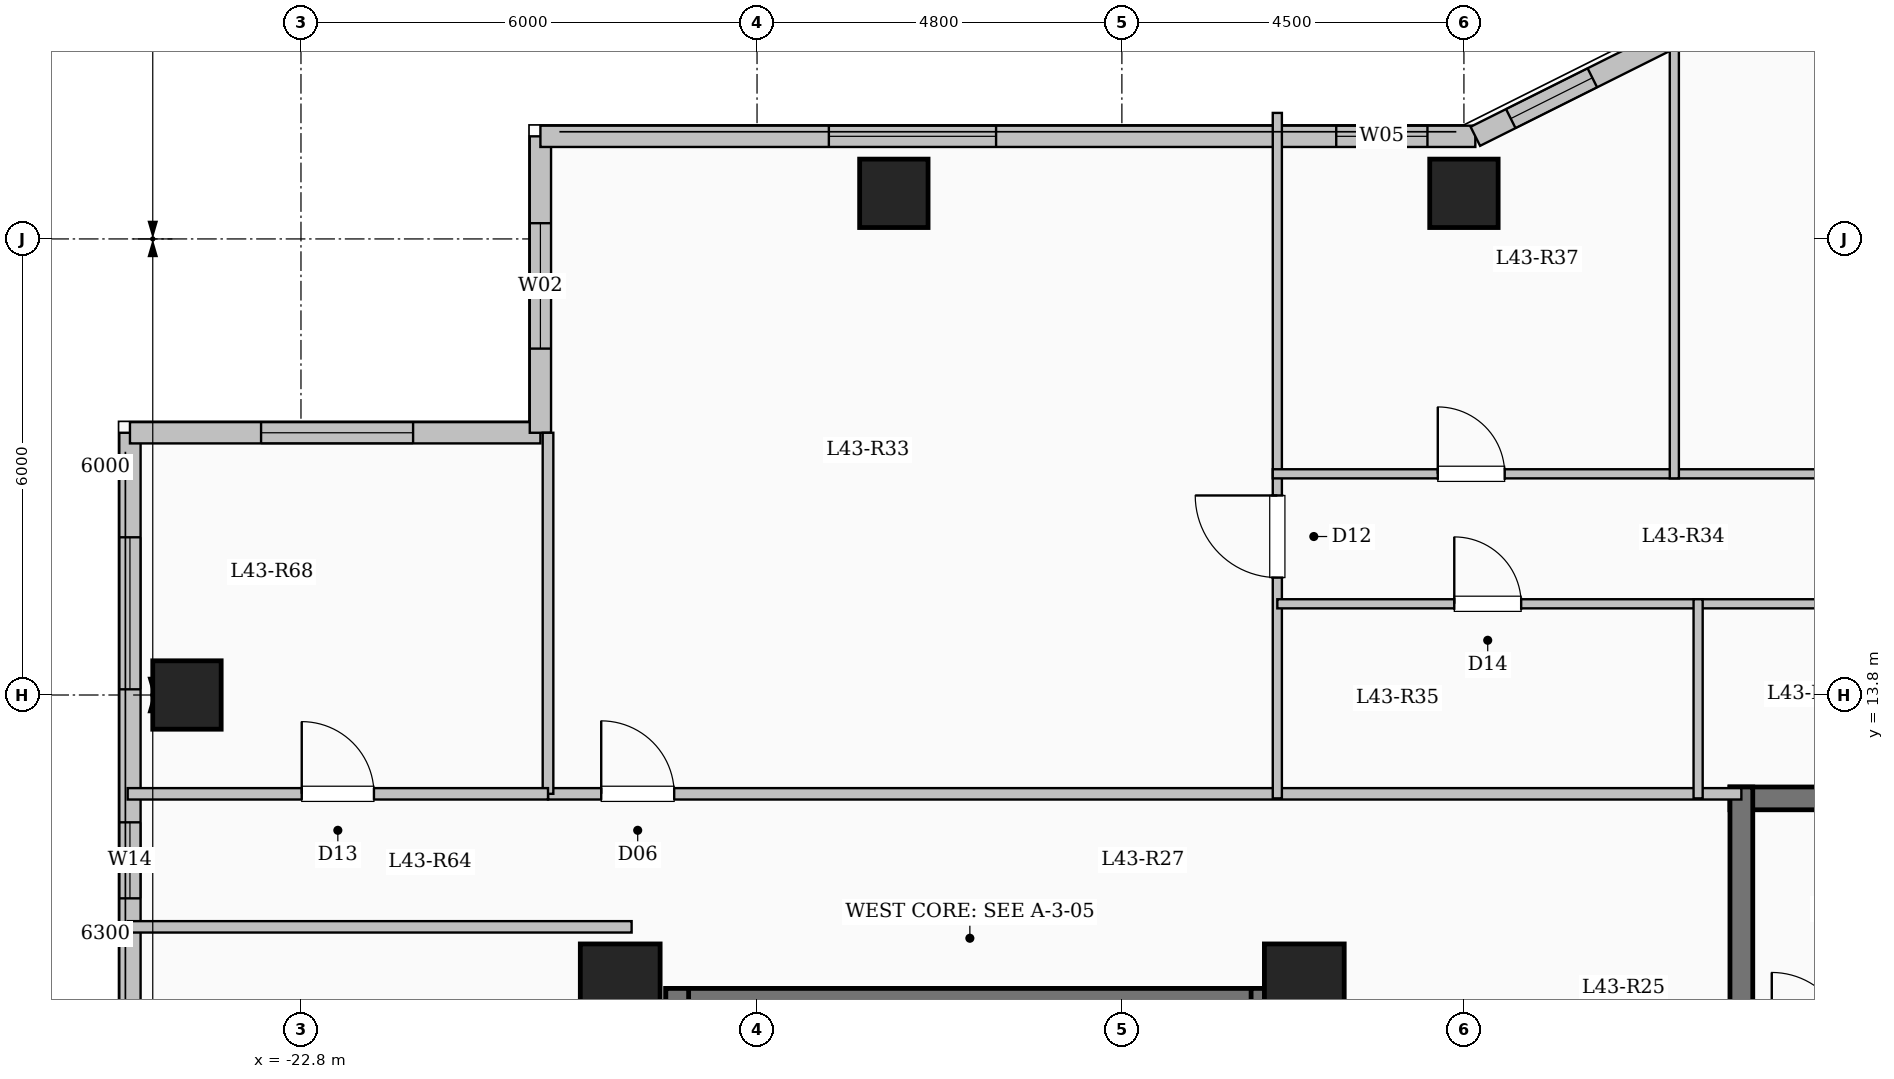
"""IFC4 building model, lengths in metres.
Left out: names, types, materials, properties, quantities, classifications, styles, units other than length and angle.
Written with IfcOpenShell. Run it as: python <this file> out.ifc"""

import sys

from ifc_helpers import new_model, si_unit, direction, frame, frame_2d, origin, origin_2d, place, context, subcontext, project, spatial, rectangle, extrude, element, fill, save


model = new_model("IFC4")
c1 = context("Model", 3, precision=1e-05, world=origin(), true_north=direction((0.0, 1.0)))
c2 = subcontext(c1, "Body", "Model", "MODEL_VIEW")
j1 = project(units=[si_unit("LENGTHUNIT", "METRE"), si_unit("PLANEANGLEUNIT", "RADIAN")], contexts=[c1])
p1 = place(None, origin())
s1 = spatial("IfcSite", under=j1, at=p1, CompositionType="ELEMENT")
p2 = place(p1, origin())
s2 = spatial("IfcBuilding", under=s1, at=p2, CompositionType="ELEMENT")
p3 = place(p2, frame((0.0, 0.0, 159.4)))
s3 = spatial("IfcBuildingStorey", under=s2, at=p3, CompositionType="ELEMENT", Elevation=159.4)
for number, where, z_axis, x_axis in (
    (1, (-9.6, 10.0, 0.0), (0.0, 0.0, 1.0), (1.0, 0.0, 0.0)),
    (2, (-18.6, 10.0, 0.0), (0.0, 0.0, 1.0), (1.0, 0.0, 0.0)),
):
    element("IfcColumn", number, at=place(p3, frame(where, z_axis=z_axis, x_axis=x_axis)), inside=s3, PredefinedType="COLUMN", context=c2, shape_type="SweptSolid", body=[
        extrude(rectangle(XDim=1.05, YDim=1.05, at=origin_2d()), origin(), (0.0, 0.0, 1.0), 3.35),
    ])
for number, where, z_axis, x_axis in (
    (3, (-15.0, 20.4, 0.0), (0.0, 0.0, 1.0), (1.0, 0.0, 0.0)),
    (4, (-7.5, 20.4, 0.0), (0.0, 0.0, 1.0), (1.0, 0.0, 0.0)),
    (5, (-24.3, 13.8, 0.0), (0.0, 0.0, 1.0), (1.0, 0.0, 0.0)),
):
    element("IfcColumn", number, at=place(p3, frame(where, z_axis=z_axis, x_axis=x_axis)), inside=s3, PredefinedType="COLUMN", context=c2, shape_type="SweptSolid", body=[
        extrude(rectangle(XDim=0.9, YDim=0.9, at=origin_2d()), origin(), (0.0, 0.0, 1.0), 3.35),
    ])
p4 = place(p3, frame((-25.05, -17.25, 0.0), z_axis=(0.0, 0.0, 1.0), x_axis=(0.0, 1.0, 0.0)))
e6 = element("IfcWall", 6, at=p4, inside=s3, PredefinedType="SOLIDWALL", context=c2, shape_type="SweptSolid", body=[
    extrude(rectangle(XDim=34.5, YDim=0.28, at=frame_2d((17.25, 0.0))), origin(), (0.0, 0.0, 1.0), 3.1),
])
p5 = place(p4, frame((2.35, 0.0, 0.9)))
e7 = element("IfcOpeningElement", 7, at=p5, cuts=e6, PredefinedType="OPENING", context=c2, shape_type="SweptSolid", body=[
    extrude(rectangle(XDim=2.2, YDim=1.75, at=frame_2d((1.1, 0.875))), frame((0.0, 0.15, 0.0), z_axis=(0.0, -1.0, 0.0), x_axis=(1.0, 0.0, 0.0)), (0.0, 0.0, 1.0), 0.3),
])
p6 = place(p4, frame((7.742, 0.0, 0.9)))
e8 = element("IfcOpeningElement", 8, at=p6, cuts=e6, PredefinedType="OPENING", context=c2, shape_type="SweptSolid", body=[
    extrude(rectangle(XDim=1.5, YDim=1.65, at=frame_2d((0.75, 0.825))), frame((0.0, 0.15, 0.0), z_axis=(0.0, -1.0, 0.0), x_axis=(1.0, 0.0, 0.0)), (0.0, 0.0, 1.0), 0.3),
])
p7 = place(p4, frame((18.0, 0.0, 0.9)))
e9 = element("IfcOpeningElement", 9, at=p7, cuts=e6, PredefinedType="OPENING", context=c2, shape_type="SweptSolid", body=[
    extrude(rectangle(XDim=2.0, YDim=1.7, at=frame_2d((1.0, 0.85))), frame((0.0, 0.15, 0.0), z_axis=(0.0, -1.0, 0.0), x_axis=(1.0, 0.0, 0.0)), (0.0, 0.0, 1.0), 0.3),
])
p8 = place(p4, frame((28.375, 0.0, 0.95)))
e10 = element("IfcOpeningElement", 10, at=p8, cuts=e6, PredefinedType="OPENING", context=c2, shape_type="SweptSolid", body=[
    extrude(rectangle(XDim=1.0, YDim=1.5, at=frame_2d((0.5, 0.75))), frame((0.0, 0.15, 0.0), z_axis=(0.0, -1.0, 0.0), x_axis=(1.0, 0.0, 0.0)), (0.0, 0.0, 1.0), 0.3),
])
p9 = place(p4, frame((31.125, 0.0, 0.9)))
e11 = element("IfcOpeningElement", 11, at=p9, cuts=e6, PredefinedType="OPENING", context=c2, shape_type="SweptSolid", body=[
    extrude(rectangle(XDim=2.0, YDim=1.7, at=frame_2d((1.0, 0.85))), frame((0.0, 0.15, 0.0), z_axis=(0.0, -1.0, 0.0), x_axis=(1.0, 0.0, 0.0)), (0.0, 0.0, 1.0), 0.3),
])
p10 = place(p3, frame((-25.05, 17.25, 0.0), z_axis=(0.0, 0.0, 1.0), x_axis=(1.0, 0.0, 0.0)))
e12 = element("IfcWall", 12, at=p10, inside=s3, PredefinedType="SOLIDWALL", context=c2, shape_type="SweptSolid", body=[
    extrude(rectangle(XDim=5.4, YDim=0.28, at=frame_2d((2.7, 0.0))), origin(), (0.0, 0.0, 1.0), 3.1),
])
p11 = place(p10, frame((1.725, 0.0, 0.9)))
e13 = element("IfcOpeningElement", 13, at=p11, cuts=e12, PredefinedType="OPENING", context=c2, shape_type="SweptSolid", body=[
    extrude(rectangle(XDim=2.0, YDim=1.7, at=frame_2d((1.0, 0.85))), frame((0.0, 0.15, 0.0), z_axis=(0.0, -1.0, 0.0), x_axis=(1.0, 0.0, 0.0)), (0.0, 0.0, 1.0), 0.3),
])
p12 = place(p3, frame((-19.65, 17.25, 0.0), z_axis=(0.0, 0.0, 1.0), x_axis=(0.0, 1.0, 0.0)))
e14 = element("IfcWall", 14, at=p12, inside=s3, PredefinedType="SOLIDWALL", context=c2, shape_type="SweptSolid", body=[
    extrude(rectangle(XDim=3.9, YDim=0.28, at=frame_2d((1.95, 0.0))), origin(), (0.0, 0.0, 1.0), 3.1),
])
p13 = place(p12, frame((1.107, 0.0, 0.9)))
e15 = element("IfcOpeningElement", 15, at=p13, cuts=e14, PredefinedType="OPENING", context=c2, shape_type="SweptSolid", body=[
    extrude(rectangle(XDim=1.65, YDim=1.6, at=frame_2d((0.825, 0.8))), frame((0.0, 0.15, 0.0), z_axis=(0.0, -1.0, 0.0), x_axis=(1.0, 0.0, 0.0)), (0.0, 0.0, 1.0), 0.3),
])
p14 = place(p3, frame((-19.65, 21.15, 0.0), z_axis=(0.0, 0.0, 1.0), x_axis=(1.0, 0.0, 0.0)))
e16 = element("IfcWall", 16, at=p14, inside=s3, PredefinedType="SOLIDWALL", context=c2, shape_type="SweptSolid", body=[
    extrude(rectangle(XDim=12.3, YDim=0.28, at=frame_2d((6.15, 0.0))), origin(), (0.0, 0.0, 1.0), 3.1),
])
p15 = place(p14, frame((3.795, 0.0, 0.9)))
e17 = element("IfcOpeningElement", 17, at=p15, cuts=e16, PredefinedType="OPENING", context=c2, shape_type="SweptSolid", body=[
    extrude(rectangle(XDim=2.2, YDim=1.75, at=frame_2d((1.1, 0.875))), frame((0.0, 0.15, 0.0), z_axis=(0.0, -1.0, 0.0), x_axis=(1.0, 0.0, 0.0)), (0.0, 0.0, 1.0), 0.3),
])
p16 = place(p14, frame((10.47, 0.0, 0.95)))
e18 = element("IfcOpeningElement", 18, at=p16, cuts=e16, PredefinedType="OPENING", context=c2, shape_type="SweptSolid", body=[
    extrude(rectangle(XDim=1.2, YDim=1.5, at=frame_2d((0.6, 0.75))), frame((0.0, 0.15, 0.0), z_axis=(0.0, -1.0, 0.0), x_axis=(1.0, 0.0, 0.0)), (0.0, 0.0, 1.0), 0.3),
])
p17 = place(p3, frame((-7.35, 21.15, 0.0), z_axis=(0.0, 0.0, 1.0), x_axis=(0.894427191, 0.4472135955, 0.0)))
e19 = element("IfcWall", 19, at=p17, inside=s3, PredefinedType="SOLIDWALL", context=c2, shape_type="SweptSolid", body=[
    extrude(rectangle(XDim=3.354, YDim=0.28, at=frame_2d((1.677, 0.0))), origin(), (0.0, 0.0, 1.0), 3.1),
])
p18 = place(p17, frame((0.521, 0.0, 0.95)))
e20 = element("IfcOpeningElement", 20, at=p18, cuts=e19, PredefinedType="OPENING", context=c2, shape_type="SweptSolid", body=[
    extrude(rectangle(XDim=1.2, YDim=1.5, at=frame_2d((0.6, 0.75))), frame((0.0, 0.15, 0.0), z_axis=(0.0, -1.0, 0.0), x_axis=(1.0, 0.0, 0.0)), (0.0, 0.0, 1.0), 0.3),
])
p19 = place(p3, frame((-18.0, 9.79, 0.0), z_axis=(0.0, 0.0, 1.0), x_axis=(1.0, 0.0, 0.0)))
e21 = element("IfcWall", 21, at=p19, inside=s3, PredefinedType="SHEAR", context=c2, shape_type="SweptSolid", body=[
    extrude(rectangle(XDim=8.0, YDim=0.3, at=frame_2d((4.0, 0.0))), origin(), (0.0, 0.0, 1.0), 3.35),
])
for number, where, z_axis, x_axis in (
    (22, (-17.85, 6.35, 0.0), (0.0, 0.0, 1.0), (0.0, 1.0, 0.0)),
    (23, (-10.15, 6.35, 0.0), (0.0, 0.0, 1.0), (0.0, 1.0, 0.0)),
):
    element("IfcWall", number, at=place(p3, frame(where, z_axis=z_axis, x_axis=x_axis)), inside=s3, PredefinedType="SHEAR", context=c2, shape_type="SweptSolid", body=[
        extrude(rectangle(XDim=3.59, YDim=0.3, at=frame_2d((1.795, 0.0))), origin(), (0.0, 0.0, 1.0), 3.35),
    ])
p20 = place(p3, frame((-4.0, 12.44, 0.0), z_axis=(0.0, 0.0, 1.0), x_axis=(1.0, 0.0, 0.0)))
e24 = element("IfcWall", 24, at=p20, inside=s3, PredefinedType="SHEAR", context=c2, shape_type="SweptSolid", body=[
    extrude(rectangle(XDim=8.0, YDim=0.3, at=frame_2d((4.0, 0.0))), origin(), (0.0, 0.0, 1.0), 3.35),
])
p21 = place(p3, frame((-3.85, 9.0, 0.0), z_axis=(0.0, 0.0, 1.0), x_axis=(0.0, 1.0, 0.0)))
e25 = element("IfcWall", 25, at=p21, inside=s3, PredefinedType="SHEAR", context=c2, shape_type="SweptSolid", body=[
    extrude(rectangle(XDim=3.59, YDim=0.3, at=frame_2d((1.795, 0.0))), origin(), (0.0, 0.0, 1.0), 3.35),
])
p22 = place(p3, frame((-19.55, 12.5, 0.0), z_axis=(0.0, 0.0, 1.0), x_axis=(1.0, 0.0, 0.0)))
e26 = element("IfcWall", 26, at=p22, inside=s3, PredefinedType="PARTITIONING", context=c2, shape_type="SweptSolid", body=[
    extrude(rectangle(XDim=15.7, YDim=0.15, at=frame_2d((7.85, 0.0))), origin(), (0.0, 0.0, 1.0), 3.1),
])
p23 = place(p22, frame((0.7, 0.0, 0.0)))
e27 = element("IfcOpeningElement", 27, at=p23, cuts=e26, PredefinedType="OPENING", context=c2, shape_type="SweptSolid", body=[
    extrude(rectangle(XDim=0.96, YDim=2.15, at=frame_2d((0.48, 1.075))), frame((0.0, 0.085, 0.0), z_axis=(0.0, -1.0, 0.0), x_axis=(1.0, 0.0, 0.0)), (0.0, 0.0, 1.0), 0.17),
])
p24 = place(p3, frame((-9.955, 12.44, 0.0), z_axis=(0.0, 0.0, 1.0), x_axis=(0.0, 1.0, 0.0)))
e28 = element("IfcWall", 28, at=p24, inside=s3, PredefinedType="PARTITIONING", context=c2, shape_type="SweptSolid", body=[
    extrude(rectangle(XDim=9.018, YDim=0.12, at=frame_2d((4.509, 0.0))), origin(), (0.0, 0.0, 1.0), 3.1),
])
p25 = place(p24, frame((2.905, 0.0, 0.0)))
e29 = element("IfcOpeningElement", 29, at=p25, cuts=e28, PredefinedType="OPENING", context=c2, shape_type="SweptSolid", body=[
    extrude(rectangle(XDim=1.08, YDim=2.15, at=frame_2d((0.54, 1.075))), frame((0.0, 0.07, 0.0), z_axis=(0.0, -1.0, 0.0), x_axis=(1.0, 0.0, 0.0)), (0.0, 0.0, 1.0), 0.14),
])
p26 = place(p3, frame((-9.955, 15.0, 0.0), z_axis=(0.0, 0.0, 1.0), x_axis=(1.0, 0.0, 0.0)))
e30 = element("IfcWall", 30, at=p26, inside=s3, PredefinedType="PARTITIONING", context=c2, shape_type="SweptSolid", body=[
    extrude(rectangle(XDim=5.536, YDim=0.12, at=frame_2d((2.768, 0.0))), origin(), (0.0, 0.0, 1.0), 3.1),
])
p27 = place(p26, frame((2.328, 0.0, 0.0)))
e31 = element("IfcOpeningElement", 31, at=p27, cuts=e30, PredefinedType="OPENING", context=c2, shape_type="SweptSolid", body=[
    extrude(rectangle(XDim=0.88, YDim=2.1, at=frame_2d((0.44, 1.05))), frame((0.0, 0.07, 0.0), z_axis=(0.0, -1.0, 0.0), x_axis=(1.0, 0.0, 0.0)), (0.0, 0.0, 1.0), 0.14),
])
p28 = place(p3, frame((-4.419, 15.0, 0.0), z_axis=(0.0, 0.0, 1.0), x_axis=(1.0, 0.0, 0.0)))
e32 = element("IfcWall", 32, at=p28, inside=s3, PredefinedType="PARTITIONING", context=c2, shape_type="SweptSolid", body=[
    extrude(rectangle(XDim=4.969, YDim=0.12, at=frame_2d((2.484, 0.0))), origin(), (0.0, 0.0, 1.0), 3.1),
])
p29 = place(p28, frame((2.044, 0.0, 0.0)))
e33 = element("IfcOpeningElement", 33, at=p29, cuts=e32, PredefinedType="OPENING", context=c2, shape_type="SweptSolid", body=[
    extrude(rectangle(XDim=0.88, YDim=2.1, at=frame_2d((0.44, 1.05))), frame((0.0, 0.07, 0.0), z_axis=(0.0, -1.0, 0.0), x_axis=(1.0, 0.0, 0.0)), (0.0, 0.0, 1.0), 0.14),
])
p30 = place(p3, frame((-10.015, 16.71, 0.0), z_axis=(0.0, 0.0, 1.0), x_axis=(1.0, 0.0, 0.0)))
e34 = element("IfcWall", 34, at=p30, inside=s3, PredefinedType="PARTITIONING", context=c2, shape_type="SweptSolid", body=[
    extrude(rectangle(XDim=10.625, YDim=0.12, at=frame_2d((5.312, 0.0))), origin(), (0.0, 0.0, 1.0), 3.1),
])
p31 = place(p30, frame((2.171, 0.0, 0.0)))
e35 = element("IfcOpeningElement", 35, at=p31, cuts=e34, PredefinedType="OPENING", context=c2, shape_type="SweptSolid", body=[
    extrude(rectangle(XDim=0.88, YDim=2.1, at=frame_2d((0.44, 1.05))), frame((0.0, 0.07, 0.0), z_axis=(0.0, -1.0, 0.0), x_axis=(1.0, 0.0, 0.0)), (0.0, 0.0, 1.0), 0.14),
])
p32 = place(p30, frame((7.394, 0.0, 0.0)))
e36 = element("IfcOpeningElement", 36, at=p32, cuts=e34, PredefinedType="OPENING", context=c2, shape_type="SweptSolid", body=[
    extrude(rectangle(XDim=0.88, YDim=2.1, at=frame_2d((0.44, 1.05))), frame((0.0, 0.07, 0.0), z_axis=(0.0, -1.0, 0.0), x_axis=(1.0, 0.0, 0.0)), (0.0, 0.0, 1.0), 0.14),
])
p33 = place(p3, frame((-4.419, 12.44, 0.0), z_axis=(0.0, 0.0, 1.0), x_axis=(0.0, 1.0, 0.0)))
e37 = element("IfcWall", 37, at=p33, inside=s3, PredefinedType="PARTITIONING", context=c2, shape_type="SweptSolid", body=[
    extrude(rectangle(XDim=2.62, YDim=0.12, at=frame_2d((1.31, 0.0))), origin(), (0.0, 0.0, 1.0), 3.1),
])
p34 = place(p3, frame((-4.732, 16.65, 0.0), z_axis=(0.0, 0.0, 1.0), x_axis=(0.0, 1.0, 0.0)))
e38 = element("IfcWall", 38, at=p34, inside=s3, PredefinedType="PARTITIONING", context=c2, shape_type="SweptSolid", body=[
    extrude(rectangle(XDim=6.03, YDim=0.12, at=frame_2d((3.015, 0.0))), origin(), (0.0, 0.0, 1.0), 3.1),
])
p35 = place(p3, frame((-25.08, 10.75, 0.0), z_axis=(0.0, 0.0, 1.0), x_axis=(1.0, 0.0, 0.0)))
e39 = element("IfcWall", 39, at=p35, inside=s3, PredefinedType="PARTITIONING", context=c2, shape_type="SweptSolid", body=[
    extrude(rectangle(XDim=6.63, YDim=0.15, at=frame_2d((3.315, 0.0))), origin(), (0.0, 0.0, 1.0), 3.1),
])
p36 = place(p3, frame((-19.55, 12.5, 0.0), z_axis=(0.0, 0.0, 1.0), x_axis=(0.0, 1.0, 0.0)))
e40 = element("IfcWall", 40, at=p36, inside=s3, PredefinedType="PARTITIONING", context=c2, shape_type="SweptSolid", body=[
    extrude(rectangle(XDim=4.75, YDim=0.14, at=frame_2d((2.375, 0.0))), origin(), (0.0, 0.0, 1.0), 3.1),
])
p37 = place(p3, frame((-25.08, 12.5, 0.0), z_axis=(0.0, 0.0, 1.0), x_axis=(1.0, 0.0, 0.0)))
e41 = element("IfcWall", 41, at=p37, inside=s3, PredefinedType="PARTITIONING", context=c2, shape_type="SweptSolid", body=[
    extrude(rectangle(XDim=5.53, YDim=0.15, at=frame_2d((2.765, 0.0))), origin(), (0.0, 0.0, 1.0), 3.1),
])
p38 = place(p37, frame((2.29, 0.0, 0.0)))
e42 = element("IfcOpeningElement", 42, at=p38, cuts=e41, PredefinedType="OPENING", context=c2, shape_type="SweptSolid", body=[
    extrude(rectangle(XDim=0.95, YDim=2.15, at=frame_2d((0.475, 1.075))), frame((0.0, 0.085, 0.0), z_axis=(0.0, -1.0, 0.0), x_axis=(1.0, 0.0, 0.0)), (0.0, 0.0, 1.0), 0.17),
])
p39 = place(p8, origin())
e43 = element("IfcWindow", 43, at=p39, inside=s3, PartitioningType="SINGLE_PANEL", PredefinedType="WINDOW", context=c2, shape_type="SweptSolid", body=[
    extrude(rectangle(XDim=1.0, YDim=1.5, at=frame_2d((0.5, 0.75))), frame((0.0, 0.03, 0.0), z_axis=(0.0, -1.0, 0.0), x_axis=(1.0, 0.0, 0.0)), (0.0, 0.0, 1.0), 0.06),
])
fill(e10, e43)
p40 = place(p9, origin())
e44 = element("IfcWindow", 44, at=p40, inside=s3, PartitioningType="SINGLE_PANEL", PredefinedType="WINDOW", context=c2, shape_type="SweptSolid", body=[
    extrude(rectangle(XDim=2.0, YDim=1.7, at=frame_2d((1.0, 0.85))), frame((0.0, 0.03, 0.0), z_axis=(0.0, -1.0, 0.0), x_axis=(1.0, 0.0, 0.0)), (0.0, 0.0, 1.0), 0.06),
])
fill(e11, e44)
p41 = place(p11, origin())
e45 = element("IfcWindow", 45, at=p41, inside=s3, PartitioningType="SINGLE_PANEL", PredefinedType="WINDOW", context=c2, shape_type="SweptSolid", body=[
    extrude(rectangle(XDim=2.0, YDim=1.7, at=frame_2d((1.0, 0.85))), frame((0.0, 0.03, 0.0), z_axis=(0.0, -1.0, 0.0), x_axis=(1.0, 0.0, 0.0)), (0.0, 0.0, 1.0), 0.06),
])
fill(e13, e45)
p42 = place(p13, origin())
e46 = element("IfcWindow", 46, at=p42, inside=s3, PartitioningType="SINGLE_PANEL", PredefinedType="WINDOW", context=c2, shape_type="SweptSolid", body=[
    extrude(rectangle(XDim=1.65, YDim=1.6, at=frame_2d((0.825, 0.8))), frame((0.0, 0.03, 0.0), z_axis=(0.0, -1.0, 0.0), x_axis=(1.0, 0.0, 0.0)), (0.0, 0.0, 1.0), 0.06),
])
fill(e15, e46)
p43 = place(p15, origin())
e47 = element("IfcWindow", 47, at=p43, inside=s3, PartitioningType="SINGLE_PANEL", PredefinedType="WINDOW", context=c2, shape_type="SweptSolid", body=[
    extrude(rectangle(XDim=2.2, YDim=1.75, at=frame_2d((1.1, 0.875))), frame((0.0, 0.03, 0.0), z_axis=(0.0, -1.0, 0.0), x_axis=(1.0, 0.0, 0.0)), (0.0, 0.0, 1.0), 0.06),
])
fill(e17, e47)
p44 = place(p16, origin())
e48 = element("IfcWindow", 48, at=p44, inside=s3, PartitioningType="SINGLE_PANEL", PredefinedType="WINDOW", context=c2, shape_type="SweptSolid", body=[
    extrude(rectangle(XDim=1.2, YDim=1.5, at=frame_2d((0.6, 0.75))), frame((0.0, 0.03, 0.0), z_axis=(0.0, -1.0, 0.0), x_axis=(1.0, 0.0, 0.0)), (0.0, 0.0, 1.0), 0.06),
])
fill(e18, e48)
p45 = place(p18, origin())
e49 = element("IfcWindow", 49, at=p45, inside=s3, PartitioningType="SINGLE_PANEL", PredefinedType="WINDOW", context=c2, shape_type="SweptSolid", body=[
    extrude(rectangle(XDim=1.2, YDim=1.5, at=frame_2d((0.6, 0.75))), frame((0.0, 0.03, 0.0), z_axis=(0.0, -1.0, 0.0), x_axis=(1.0, 0.0, 0.0)), (0.0, 0.0, 1.0), 0.06),
])
fill(e20, e49)
p46 = place(p23, origin())
e50 = element("IfcDoor", 50, at=p46, inside=s3, OperationType="SINGLE_SWING_LEFT", PredefinedType="DOOR", context=c2, shape_type="SweptSolid", body=[
    extrude(rectangle(XDim=0.96, YDim=2.15, at=frame_2d((0.48, 1.075))), frame((0.0, 0.025, 0.0), z_axis=(0.0, -1.0, 0.0), x_axis=(1.0, 0.0, 0.0)), (0.0, 0.0, 1.0), 0.05),
])
fill(e27, e50)
p47 = place(p25, origin())
e51 = element("IfcDoor", 51, at=p47, inside=s3, OperationType="SINGLE_SWING_RIGHT", PredefinedType="DOOR", context=c2, shape_type="SweptSolid", body=[
    extrude(rectangle(XDim=1.08, YDim=2.15, at=frame_2d((0.54, 1.075))), frame((0.0, 0.025, 0.0), z_axis=(0.0, -1.0, 0.0), x_axis=(1.0, 0.0, 0.0)), (0.0, 0.0, 1.0), 0.05),
])
fill(e29, e51)
p48 = place(p27, origin())
e52 = element("IfcDoor", 52, at=p48, inside=s3, OperationType="SINGLE_SWING_LEFT", PredefinedType="DOOR", context=c2, shape_type="SweptSolid", body=[
    extrude(rectangle(XDim=0.88, YDim=2.1, at=frame_2d((0.44, 1.05))), frame((0.0, 0.025, 0.0), z_axis=(0.0, -1.0, 0.0), x_axis=(1.0, 0.0, 0.0)), (0.0, 0.0, 1.0), 0.05),
])
fill(e31, e52)
p49 = place(p31, origin())
e53 = element("IfcDoor", 53, at=p49, inside=s3, OperationType="SINGLE_SWING_LEFT", PredefinedType="DOOR", context=c2, shape_type="SweptSolid", body=[
    extrude(rectangle(XDim=0.88, YDim=2.1, at=frame_2d((0.44, 1.05))), frame((0.0, 0.025, 0.0), z_axis=(0.0, -1.0, 0.0), x_axis=(1.0, 0.0, 0.0)), (0.0, 0.0, 1.0), 0.05),
])
fill(e35, e53)
p50 = place(p38, origin())
e54 = element("IfcDoor", 54, at=p50, inside=s3, OperationType="SINGLE_SWING_LEFT", PredefinedType="DOOR", context=c2, shape_type="SweptSolid", body=[
    extrude(rectangle(XDim=0.95, YDim=2.15, at=frame_2d((0.475, 1.075))), frame((0.0, 0.025, 0.0), z_axis=(0.0, -1.0, 0.0), x_axis=(1.0, 0.0, 0.0)), (0.0, 0.0, 1.0), 0.05),
])
fill(e42, e54)
save(model, sys.argv[1])
